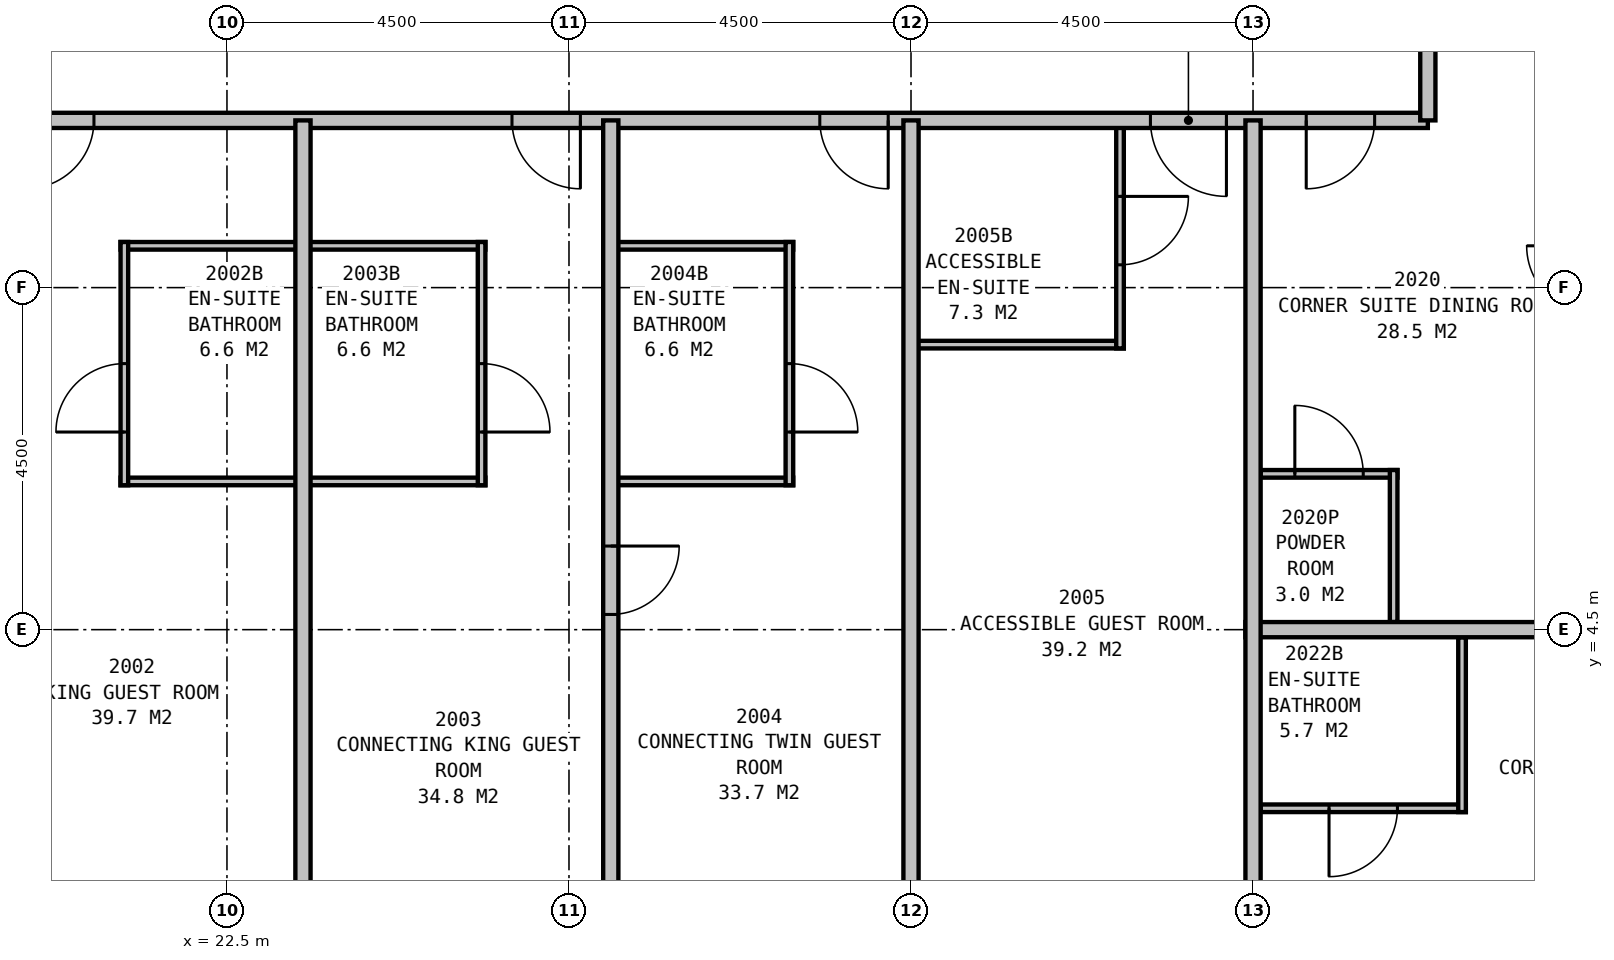
"""IFC4 building model, lengths in metres.
Left out: names, types, materials, properties, quantities, classifications, styles, units other than length and angle.
Written with IfcOpenShell. Run it as: python <this file> out.ifc"""

import sys

from ifc_helpers import new_model, si_unit, direction, frame, frame_2d, origin, place, context, subcontext, project, spatial, rectangle, extrude, element, fill, save


model = new_model("IFC4")
c1 = context("Model", 3, precision=1e-05, world=origin(), true_north=direction((0.0, 1.0)))
c2 = subcontext(c1, "Body", "Model", "MODEL_VIEW")
j1 = project(units=[si_unit("LENGTHUNIT", "METRE"), si_unit("PLANEANGLEUNIT", "RADIAN")], contexts=[c1])
p1 = place(None, origin())
s1 = spatial("IfcSite", under=j1, at=p1, CompositionType="ELEMENT")
p2 = place(p1, origin())
s2 = spatial("IfcBuilding", under=s1, at=p2, CompositionType="ELEMENT")
p3 = place(p2, frame((0.0, 0.0, 82.2)))
s3 = spatial("IfcBuildingStorey", under=s2, at=p3, CompositionType="ELEMENT", Elevation=82.2)
p4 = place(p3, frame((11.2, 11.2, 0.0), z_axis=(0.0, 0.0, 1.0), x_axis=(1.0, 0.0, 0.0)))
e1 = element("IfcWall", 1, at=p4, inside=s3, PredefinedType="PARTITIONING", context=c2, shape_type="SweptSolid", body=[
    extrude(rectangle(XDim=27.1, YDim=0.2, at=frame_2d((13.55, 0.0))), origin(), (0.0, 0.0, 1.0), 3.25),
])
p5 = place(p4, frame((6.45, 0.0, 0.0), z_axis=(0.0, 0.0, 1.0), x_axis=(-1.0, 0.0, 0.0)))
e2 = element("IfcOpeningElement", 2, at=p5, cuts=e1, PredefinedType="OPENING", context=c2, shape_type="SweptSolid", body=[
    extrude(rectangle(XDim=1.0, YDim=2.1, at=frame_2d((0.5, 1.05))), frame((0.0, 0.11, 0.0), z_axis=(0.0, -1.0, 0.0), x_axis=(1.0, 0.0, 0.0)), (0.0, 0.0, 1.0), 0.22),
])
p6 = place(p4, frame((9.55, 0.0, 0.0), z_axis=(0.0, 0.0, 1.0), x_axis=(-1.0, 0.0, 0.0)))
e3 = element("IfcOpeningElement", 3, at=p6, cuts=e1, PredefinedType="OPENING", context=c2, shape_type="SweptSolid", body=[
    extrude(rectangle(XDim=0.9, YDim=2.1, at=frame_2d((0.45, 1.05))), frame((0.0, 0.11, 0.0), z_axis=(0.0, -1.0, 0.0), x_axis=(1.0, 0.0, 0.0)), (0.0, 0.0, 1.0), 0.22),
])
p7 = place(p4, frame((15.95, 0.0, 0.0), z_axis=(0.0, 0.0, 1.0), x_axis=(-1.0, 0.0, 0.0)))
e4 = element("IfcOpeningElement", 4, at=p7, cuts=e1, PredefinedType="OPENING", context=c2, shape_type="SweptSolid", body=[
    extrude(rectangle(XDim=0.9, YDim=2.1, at=frame_2d((0.45, 1.05))), frame((0.0, 0.11, 0.0), z_axis=(0.0, -1.0, 0.0), x_axis=(1.0, 0.0, 0.0)), (0.0, 0.0, 1.0), 0.22),
])
p8 = place(p4, frame((20.0, 0.0, 0.0), z_axis=(0.0, 0.0, 1.0), x_axis=(-1.0, 0.0, 0.0)))
e5 = element("IfcOpeningElement", 5, at=p8, cuts=e1, PredefinedType="OPENING", context=c2, shape_type="SweptSolid", body=[
    extrude(rectangle(XDim=0.9, YDim=2.1, at=frame_2d((0.45, 1.05))), frame((0.0, 0.11, 0.0), z_axis=(0.0, -1.0, 0.0), x_axis=(1.0, 0.0, 0.0)), (0.0, 0.0, 1.0), 0.22),
])
p9 = place(p4, frame((24.45, 0.0, 0.0), z_axis=(0.0, 0.0, 1.0), x_axis=(-1.0, 0.0, 0.0)))
e6 = element("IfcOpeningElement", 6, at=p9, cuts=e1, PredefinedType="OPENING", context=c2, shape_type="SweptSolid", body=[
    extrude(rectangle(XDim=1.0, YDim=2.1, at=frame_2d((0.5, 1.05))), frame((0.0, 0.11, 0.0), z_axis=(0.0, -1.0, 0.0), x_axis=(1.0, 0.0, 0.0)), (0.0, 0.0, 1.0), 0.22),
])
p10 = place(p4, frame((1.6, 0.0, 0.0), z_axis=(0.0, 0.0, 1.0), x_axis=(-1.0, 0.0, 0.0)))
e7 = element("IfcOpeningElement", 7, at=p10, cuts=e1, PredefinedType="OPENING", context=c2, shape_type="SweptSolid", body=[
    extrude(rectangle(XDim=0.9, YDim=2.1, at=frame_2d((0.45, 1.05))), frame((0.0, 0.11, 0.0), z_axis=(0.0, -1.0, 0.0), x_axis=(1.0, 0.0, 0.0)), (0.0, 0.0, 1.0), 0.22),
])
p11 = place(p4, frame((26.4, 0.0, 0.0), z_axis=(0.0, 0.0, 1.0), x_axis=(-1.0, 0.0, 0.0)))
e8 = element("IfcOpeningElement", 8, at=p11, cuts=e1, PredefinedType="OPENING", context=c2, shape_type="SweptSolid", body=[
    extrude(rectangle(XDim=0.9, YDim=2.1, at=frame_2d((0.45, 1.05))), frame((0.0, 0.11, 0.0), z_axis=(0.0, -1.0, 0.0), x_axis=(1.0, 0.0, 0.0)), (0.0, 0.0, 1.0), 0.22),
])
p12 = place(p3, frame((38.3, 11.2, 0.0), z_axis=(0.0, 0.0, 1.0), x_axis=(0.0, 1.0, 0.0)))
e9 = element("IfcWall", 9, at=p12, inside=s3, PredefinedType="PARTITIONING", context=c2, shape_type="SweptSolid", body=[
    extrude(rectangle(XDim=18.7, YDim=0.2, at=frame_2d((9.35, 0.0))), origin(), (0.0, 0.0, 1.0), 3.25),
])
p13 = place(p12, frame((6.45, 0.0, 0.0), z_axis=(0.0, 0.0, 1.0), x_axis=(-1.0, 0.0, 0.0)))
e10 = element("IfcOpeningElement", 10, at=p13, cuts=e9, PredefinedType="OPENING", context=c2, shape_type="SweptSolid", body=[
    extrude(rectangle(XDim=1.0, YDim=2.1, at=frame_2d((0.5, 1.05))), frame((0.0, 0.11, 0.0), z_axis=(0.0, -1.0, 0.0), x_axis=(1.0, 0.0, 0.0)), (0.0, 0.0, 1.0), 0.22),
])
p14 = place(p12, frame((8.0, 0.0, 0.0), z_axis=(0.0, 0.0, 1.0), x_axis=(-1.0, 0.0, 0.0)))
e11 = element("IfcOpeningElement", 11, at=p14, cuts=e9, PredefinedType="OPENING", context=c2, shape_type="SweptSolid", body=[
    extrude(rectangle(XDim=0.9, YDim=2.1, at=frame_2d((0.45, 1.05))), frame((0.0, 0.11, 0.0), z_axis=(0.0, -1.0, 0.0), x_axis=(1.0, 0.0, 0.0)), (0.0, 0.0, 1.0), 0.22),
])
p15 = place(p3, frame((23.5, 11.2, 0.0), z_axis=(0.0, 0.0, 1.0), x_axis=(0.0, -1.0, 0.0)))
e12 = element("IfcWall", 12, at=p15, inside=s3, PredefinedType="PARTITIONING", context=c2, shape_type="SweptSolid", body=[
    extrude(rectangle(XDim=11.2, YDim=0.2, at=frame_2d((5.6, 0.0))), origin(), (0.0, 0.0, 1.0), 3.25),
])
p16 = place(p3, frame((27.55, 11.2, 0.0), z_axis=(0.0, 0.0, 1.0), x_axis=(0.0, -1.0, 0.0)))
e13 = element("IfcWall", 13, at=p16, inside=s3, PredefinedType="PARTITIONING", context=c2, shape_type="SweptSolid", body=[
    extrude(rectangle(XDim=11.2, YDim=0.2, at=frame_2d((5.6, 0.0))), origin(), (0.0, 0.0, 1.0), 2.2),
])
p17 = place(p16, frame((5.6, 0.0, 0.0)))
e14 = element("IfcOpeningElement", 14, at=p17, cuts=e13, PredefinedType="OPENING", context=c2, shape_type="SweptSolid", body=[
    extrude(rectangle(XDim=0.9, YDim=2.1, at=frame_2d((0.45, 1.05))), frame((0.0, 0.11, 0.0), z_axis=(0.0, -1.0, 0.0), x_axis=(1.0, 0.0, 0.0)), (0.0, 0.0, 1.0), 0.22),
])
p18 = place(p3, frame((31.5, 11.2, 0.0), z_axis=(0.0, 0.0, 1.0), x_axis=(0.0, -1.0, 0.0)))
e15 = element("IfcWall", 15, at=p18, inside=s3, PredefinedType="PARTITIONING", context=c2, shape_type="SweptSolid", body=[
    extrude(rectangle(XDim=11.2, YDim=0.2, at=frame_2d((5.6, 0.0))), origin(), (0.0, 0.0, 1.0), 2.2),
])
for number, where, z_axis, x_axis in (
    (16, (21.1, 9.55, 0.0), (0.0, 0.0, 1.0), (1.0, 0.0, 0.0)),
    (17, (21.1, 6.45, 0.0), (0.0, 0.0, 1.0), (1.0, 0.0, 0.0)),
):
    element("IfcWall", number, at=place(p3, frame(where, z_axis=z_axis, x_axis=x_axis)), inside=s3, PredefinedType="PLUMBINGWALL", context=c2, shape_type="SweptSolid", body=[
        extrude(rectangle(XDim=2.4, YDim=0.1, at=frame_2d((1.2, 0.0))), origin(), (0.0, 0.0, 1.0), 3.25),
    ])
p19 = place(p3, frame((21.15, 9.6, 0.0), z_axis=(0.0, 0.0, 1.0), x_axis=(0.0, -1.0, 0.0)))
e18 = element("IfcWall", 18, at=p19, inside=s3, PredefinedType="PLUMBINGWALL", context=c2, shape_type="SweptSolid", body=[
    extrude(rectangle(XDim=3.2, YDim=0.1, at=frame_2d((1.6, 0.0))), origin(), (0.0, 0.0, 1.0), 3.25),
])
p20 = place(p19, frame((2.5, 0.0, 0.0), z_axis=(0.0, 0.0, 1.0), x_axis=(-1.0, 0.0, 0.0)))
e19 = element("IfcOpeningElement", 19, at=p20, cuts=e18, PredefinedType="OPENING", context=c2, shape_type="SweptSolid", body=[
    extrude(rectangle(XDim=0.9, YDim=2.1, at=frame_2d((0.45, 1.05))), frame((0.0, 0.06, 0.0), z_axis=(0.0, -1.0, 0.0), x_axis=(1.0, 0.0, 0.0)), (0.0, 0.0, 1.0), 0.12),
])
for number, where, z_axis, x_axis in (
    (20, (23.5, 9.55, 0.0), (0.0, 0.0, 1.0), (1.0, 0.0, 0.0)),
    (21, (23.5, 6.45, 0.0), (0.0, 0.0, 1.0), (1.0, 0.0, 0.0)),
):
    element("IfcWall", number, at=place(p3, frame(where, z_axis=z_axis, x_axis=x_axis)), inside=s3, PredefinedType="PLUMBINGWALL", context=c2, shape_type="SweptSolid", body=[
        extrude(rectangle(XDim=2.4, YDim=0.1, at=frame_2d((1.2, 0.0))), origin(), (0.0, 0.0, 1.0), 3.25),
    ])
p21 = place(p3, frame((25.85, 9.6, 0.0), z_axis=(0.0, 0.0, 1.0), x_axis=(0.0, -1.0, 0.0)))
e22 = element("IfcWall", 22, at=p21, inside=s3, PredefinedType="PLUMBINGWALL", context=c2, shape_type="SweptSolid", body=[
    extrude(rectangle(XDim=3.2, YDim=0.1, at=frame_2d((1.6, 0.0))), origin(), (0.0, 0.0, 1.0), 3.25),
])
p22 = place(p21, frame((1.6, 0.0, 0.0)))
e23 = element("IfcOpeningElement", 23, at=p22, cuts=e22, PredefinedType="OPENING", context=c2, shape_type="SweptSolid", body=[
    extrude(rectangle(XDim=0.9, YDim=2.1, at=frame_2d((0.45, 1.05))), frame((0.0, 0.06, 0.0), z_axis=(0.0, -1.0, 0.0), x_axis=(1.0, 0.0, 0.0)), (0.0, 0.0, 1.0), 0.12),
])
for number, where, z_axis, x_axis in (
    (24, (27.55, 9.55, 0.0), (0.0, 0.0, 1.0), (1.0, 0.0, 0.0)),
    (25, (27.55, 6.45, 0.0), (0.0, 0.0, 1.0), (1.0, 0.0, 0.0)),
):
    element("IfcWall", number, at=place(p3, frame(where, z_axis=z_axis, x_axis=x_axis)), inside=s3, PredefinedType="PLUMBINGWALL", context=c2, shape_type="SweptSolid", body=[
        extrude(rectangle(XDim=2.4, YDim=0.1, at=frame_2d((1.2, 0.0))), origin(), (0.0, 0.0, 1.0), 3.25),
    ])
p23 = place(p3, frame((29.9, 9.6, 0.0), z_axis=(0.0, 0.0, 1.0), x_axis=(0.0, -1.0, 0.0)))
e26 = element("IfcWall", 26, at=p23, inside=s3, PredefinedType="PLUMBINGWALL", context=c2, shape_type="SweptSolid", body=[
    extrude(rectangle(XDim=3.2, YDim=0.1, at=frame_2d((1.6, 0.0))), origin(), (0.0, 0.0, 1.0), 3.25),
])
p24 = place(p23, frame((1.6, 0.0, 0.0)))
e27 = element("IfcOpeningElement", 27, at=p24, cuts=e26, PredefinedType="OPENING", context=c2, shape_type="SweptSolid", body=[
    extrude(rectangle(XDim=0.9, YDim=2.1, at=frame_2d((0.45, 1.05))), frame((0.0, 0.06, 0.0), z_axis=(0.0, -1.0, 0.0), x_axis=(1.0, 0.0, 0.0)), (0.0, 0.0, 1.0), 0.12),
])
p25 = place(p3, frame((31.5, 8.25, 0.0), z_axis=(0.0, 0.0, 1.0), x_axis=(1.0, 0.0, 0.0)))
e28 = element("IfcWall", 28, at=p25, inside=s3, PredefinedType="PLUMBINGWALL", context=c2, shape_type="SweptSolid", body=[
    extrude(rectangle(XDim=2.8, YDim=0.1, at=frame_2d((1.4, 0.0))), origin(), (0.0, 0.0, 1.0), 3.25),
])
p26 = place(p3, frame((34.25, 11.2, 0.0), z_axis=(0.0, 0.0, 1.0), x_axis=(0.0, -1.0, 0.0)))
e29 = element("IfcWall", 29, at=p26, inside=s3, PredefinedType="PLUMBINGWALL", context=c2, shape_type="SweptSolid", body=[
    extrude(rectangle(XDim=3.0, YDim=0.1, at=frame_2d((1.5, 0.0))), origin(), (0.0, 0.0, 1.0), 3.25),
])
p27 = place(p26, frame((1.0, 0.0, 0.0)))
e30 = element("IfcOpeningElement", 30, at=p27, cuts=e29, PredefinedType="OPENING", context=c2, shape_type="SweptSolid", body=[
    extrude(rectangle(XDim=0.9, YDim=2.1, at=frame_2d((0.45, 1.05))), frame((0.0, 0.06, 0.0), z_axis=(0.0, -1.0, 0.0), x_axis=(1.0, 0.0, 0.0)), (0.0, 0.0, 1.0), 0.12),
])
p28 = place(p3, frame((36.0, 11.2, 0.0), z_axis=(0.0, 0.0, 1.0), x_axis=(0.0, -1.0, 0.0)))
e31 = element("IfcWall", 31, at=p28, inside=s3, PredefinedType="PARTITIONING", context=c2, shape_type="SweptSolid", body=[
    extrude(rectangle(XDim=11.2, YDim=0.2, at=frame_2d((5.6, 0.0))), origin(), (0.0, 0.0, 1.0), 2.2),
])
p29 = place(p3, frame((35.9, 4.5, 0.0), z_axis=(0.0, 0.0, 1.0), x_axis=(1.0, 0.0, 0.0)))
e32 = element("IfcWall", 32, at=p29, inside=s3, PredefinedType="PARTITIONING", context=c2, shape_type="SweptSolid", body=[
    extrude(rectangle(XDim=9.1, YDim=0.2, at=frame_2d((4.55, 0.0))), origin(), (0.0, 0.0, 1.0), 3.25),
])
p30 = place(p29, frame((7.1, 0.0, 0.0)))
e33 = element("IfcOpeningElement", 33, at=p30, cuts=e32, PredefinedType="OPENING", context=c2, shape_type="SweptSolid", body=[
    extrude(rectangle(XDim=0.9, YDim=2.1, at=frame_2d((0.45, 1.05))), frame((0.0, 0.11, 0.0), z_axis=(0.0, -1.0, 0.0), x_axis=(1.0, 0.0, 0.0)), (0.0, 0.0, 1.0), 0.22),
])
p31 = place(p3, frame((37.85, 4.6, 0.0), z_axis=(0.0, 0.0, 1.0), x_axis=(0.0, 1.0, 0.0)))
e34 = element("IfcWall", 34, at=p31, inside=s3, PredefinedType="PLUMBINGWALL", context=c2, shape_type="SweptSolid", body=[
    extrude(rectangle(XDim=2.0, YDim=0.1, at=frame_2d((1.0, 0.0))), origin(), (0.0, 0.0, 1.0), 3.25),
])
p32 = place(p3, frame((36.1, 6.55, 0.0), z_axis=(0.0, 0.0, 1.0), x_axis=(1.0, 0.0, 0.0)))
e35 = element("IfcWall", 35, at=p32, inside=s3, PredefinedType="PLUMBINGWALL", context=c2, shape_type="SweptSolid", body=[
    extrude(rectangle(XDim=1.8, YDim=0.1, at=frame_2d((0.9, 0.0))), origin(), (0.0, 0.0, 1.0), 3.25),
])
p33 = place(p32, frame((0.45, 0.0, 0.0)))
e36 = element("IfcOpeningElement", 36, at=p33, cuts=e35, PredefinedType="OPENING", context=c2, shape_type="SweptSolid", body=[
    extrude(rectangle(XDim=0.9, YDim=2.1, at=frame_2d((0.45, 1.05))), frame((0.0, 0.06, 0.0), z_axis=(0.0, -1.0, 0.0), x_axis=(1.0, 0.0, 0.0)), (0.0, 0.0, 1.0), 0.12),
])
p34 = place(p3, frame((38.75, 4.4, 0.0), z_axis=(0.0, 0.0, 1.0), x_axis=(0.0, -1.0, 0.0)))
e37 = element("IfcWall", 37, at=p34, inside=s3, PredefinedType="PLUMBINGWALL", context=c2, shape_type="SweptSolid", body=[
    extrude(rectangle(XDim=2.3, YDim=0.1, at=frame_2d((1.15, 0.0))), origin(), (0.0, 0.0, 1.0), 3.25),
])
p35 = place(p3, frame((36.1, 2.15, 0.0), z_axis=(0.0, 0.0, 1.0), x_axis=(1.0, 0.0, 0.0)))
e38 = element("IfcWall", 38, at=p35, inside=s3, PredefinedType="PLUMBINGWALL", context=c2, shape_type="SweptSolid", body=[
    extrude(rectangle(XDim=2.7, YDim=0.1, at=frame_2d((1.35, 0.0))), origin(), (0.0, 0.0, 1.0), 3.25),
])
p36 = place(p35, frame((1.8, 0.0, 0.0), z_axis=(0.0, 0.0, 1.0), x_axis=(-1.0, 0.0, 0.0)))
e39 = element("IfcOpeningElement", 39, at=p36, cuts=e38, PredefinedType="OPENING", context=c2, shape_type="SweptSolid", body=[
    extrude(rectangle(XDim=0.9, YDim=2.1, at=frame_2d((0.45, 1.05))), frame((0.0, 0.06, 0.0), z_axis=(0.0, -1.0, 0.0), x_axis=(1.0, 0.0, 0.0)), (0.0, 0.0, 1.0), 0.12),
])
p37 = place(p6, origin())
e40 = element("IfcDoor", 40, at=p37, inside=s3, OperationType="SINGLE_SWING_RIGHT", PredefinedType="DOOR", context=c2, shape_type="SweptSolid", body=[
    extrude(rectangle(XDim=0.9, YDim=2.1, at=frame_2d((0.45, 1.05))), frame((0.0, 0.025, 0.0), z_axis=(0.0, -1.0, 0.0), x_axis=(1.0, 0.0, 0.0)), (0.0, 0.0, 1.0), 0.05),
])
fill(e3, e40)
p38 = place(p7, origin())
e41 = element("IfcDoor", 41, at=p38, inside=s3, OperationType="SINGLE_SWING_LEFT", PredefinedType="DOOR", context=c2, shape_type="SweptSolid", body=[
    extrude(rectangle(XDim=0.9, YDim=2.1, at=frame_2d((0.45, 1.05))), frame((0.0, 0.025, 0.0), z_axis=(0.0, -1.0, 0.0), x_axis=(1.0, 0.0, 0.0)), (0.0, 0.0, 1.0), 0.05),
])
fill(e4, e41)
p39 = place(p8, origin())
e42 = element("IfcDoor", 42, at=p39, inside=s3, OperationType="SINGLE_SWING_LEFT", PredefinedType="DOOR", context=c2, shape_type="SweptSolid", body=[
    extrude(rectangle(XDim=0.9, YDim=2.1, at=frame_2d((0.45, 1.05))), frame((0.0, 0.025, 0.0), z_axis=(0.0, -1.0, 0.0), x_axis=(1.0, 0.0, 0.0)), (0.0, 0.0, 1.0), 0.05),
])
fill(e5, e42)
p40 = place(p9, origin())
e43 = element("IfcDoor", 43, at=p40, inside=s3, OperationType="SINGLE_SWING_LEFT", PredefinedType="DOOR", context=c2, shape_type="SweptSolid", body=[
    extrude(rectangle(XDim=1.0, YDim=2.1, at=frame_2d((0.5, 1.05))), frame((0.0, 0.025, 0.0), z_axis=(0.0, -1.0, 0.0), x_axis=(1.0, 0.0, 0.0)), (0.0, 0.0, 1.0), 0.05),
])
fill(e6, e43)
p41 = place(p11, origin())
e44 = element("IfcDoor", 44, at=p41, inside=s3, OperationType="SINGLE_SWING_RIGHT", PredefinedType="DOOR", context=c2, shape_type="SweptSolid", body=[
    extrude(rectangle(XDim=0.9, YDim=2.1, at=frame_2d((0.45, 1.05))), frame((0.0, 0.025, 0.0), z_axis=(0.0, -1.0, 0.0), x_axis=(1.0, 0.0, 0.0)), (0.0, 0.0, 1.0), 0.05),
])
fill(e8, e44)
p42 = place(p17, origin())
e45 = element("IfcDoor", 45, at=p42, inside=s3, OperationType="SINGLE_SWING_LEFT", PredefinedType="DOOR", context=c2, shape_type="SweptSolid", body=[
    extrude(rectangle(XDim=0.9, YDim=2.1, at=frame_2d((0.45, 1.05))), frame((0.0, 0.025, 0.0), z_axis=(0.0, -1.0, 0.0), x_axis=(1.0, 0.0, 0.0)), (0.0, 0.0, 1.0), 0.05),
])
fill(e14, e45)
p43 = place(p20, origin())
e46 = element("IfcDoor", 46, at=p43, inside=s3, OperationType="SINGLE_SWING_LEFT", PredefinedType="DOOR", context=c2, shape_type="SweptSolid", body=[
    extrude(rectangle(XDim=0.9, YDim=2.1, at=frame_2d((0.45, 1.05))), frame((0.0, 0.025, 0.0), z_axis=(0.0, -1.0, 0.0), x_axis=(1.0, 0.0, 0.0)), (0.0, 0.0, 1.0), 0.05),
])
fill(e19, e46)
p44 = place(p22, origin())
e47 = element("IfcDoor", 47, at=p44, inside=s3, OperationType="SINGLE_SWING_RIGHT", PredefinedType="DOOR", context=c2, shape_type="SweptSolid", body=[
    extrude(rectangle(XDim=0.9, YDim=2.1, at=frame_2d((0.45, 1.05))), frame((0.0, 0.025, 0.0), z_axis=(0.0, -1.0, 0.0), x_axis=(1.0, 0.0, 0.0)), (0.0, 0.0, 1.0), 0.05),
])
fill(e23, e47)
p45 = place(p24, origin())
e48 = element("IfcDoor", 48, at=p45, inside=s3, OperationType="SINGLE_SWING_RIGHT", PredefinedType="DOOR", context=c2, shape_type="SweptSolid", body=[
    extrude(rectangle(XDim=0.9, YDim=2.1, at=frame_2d((0.45, 1.05))), frame((0.0, 0.025, 0.0), z_axis=(0.0, -1.0, 0.0), x_axis=(1.0, 0.0, 0.0)), (0.0, 0.0, 1.0), 0.05),
])
fill(e27, e48)
p46 = place(p27, origin())
e49 = element("IfcDoor", 49, at=p46, inside=s3, OperationType="SINGLE_SWING_LEFT", PredefinedType="DOOR", context=c2, shape_type="SweptSolid", body=[
    extrude(rectangle(XDim=0.9, YDim=2.1, at=frame_2d((0.45, 1.05))), frame((0.0, 0.025, 0.0), z_axis=(0.0, -1.0, 0.0), x_axis=(1.0, 0.0, 0.0)), (0.0, 0.0, 1.0), 0.05),
])
fill(e30, e49)
p47 = place(p33, origin())
e50 = element("IfcDoor", 50, at=p47, inside=s3, OperationType="SINGLE_SWING_LEFT", PredefinedType="DOOR", context=c2, shape_type="SweptSolid", body=[
    extrude(rectangle(XDim=0.9, YDim=2.1, at=frame_2d((0.45, 1.05))), frame((0.0, 0.025, 0.0), z_axis=(0.0, -1.0, 0.0), x_axis=(1.0, 0.0, 0.0)), (0.0, 0.0, 1.0), 0.05),
])
fill(e36, e50)
p48 = place(p36, origin())
e51 = element("IfcDoor", 51, at=p48, inside=s3, OperationType="SINGLE_SWING_RIGHT", PredefinedType="DOOR", context=c2, shape_type="SweptSolid", body=[
    extrude(rectangle(XDim=0.9, YDim=2.1, at=frame_2d((0.45, 1.05))), frame((0.0, 0.025, 0.0), z_axis=(0.0, -1.0, 0.0), x_axis=(1.0, 0.0, 0.0)), (0.0, 0.0, 1.0), 0.05),
])
fill(e39, e51)
save(model, sys.argv[1])
